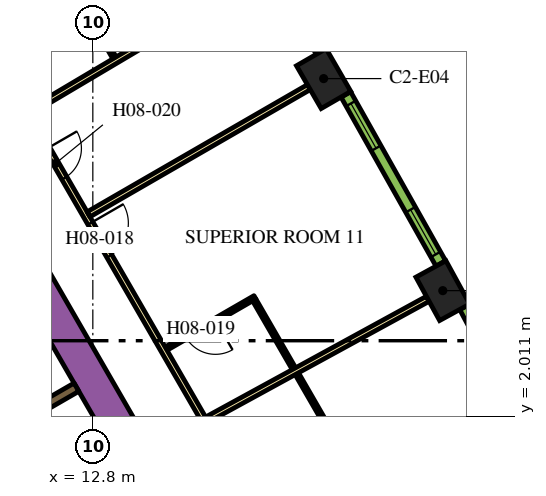
"""IFC4 building model, lengths in metres.
Left out: names, types, materials, properties, quantities, classifications, styles, units other than length and angle.
Written with IfcOpenShell. Run it as: python <this file> out.ifc"""

import sys

from ifc_helpers import new_model, si_unit, direction, frame, frame_2d, origin, origin_2d, place, context, subcontext, project, spatial, rectangle, extrude, element, fill, save


model = new_model("IFC4")
c1 = context("Model", 3, precision=1e-05, world=origin(), true_north=direction((0.0, 1.0)))
c2 = subcontext(c1, "Body", "Model", "MODEL_VIEW")
j1 = project(units=[si_unit("LENGTHUNIT", "METRE"), si_unit("PLANEANGLEUNIT", "RADIAN")], contexts=[c1])
p1 = place(None, origin())
s1 = spatial("IfcSite", under=j1, at=p1, CompositionType="ELEMENT")
p2 = place(p1, origin())
s2 = spatial("IfcBuilding", under=s1, at=p2, CompositionType="ELEMENT")
p3 = place(p2, frame((0.0, 0.0, 107.1)))
s3 = spatial("IfcBuildingStorey", under=s2, at=p3, CompositionType="ELEMENT", Elevation=107.1)
for number, where, z_axis, x_axis in (
    (1, (22.009, 5.317, 0.0), (0.0, 0.0, 1.0), (-0.48, 0.877, 0.0)),
    (2, (18.874, 10.897, 0.0), (0.0, 0.0, 1.0), (-0.5, 0.866, 0.0)),
):
    element("IfcColumn", number, at=place(p3, frame(where, z_axis=z_axis, x_axis=x_axis)), inside=s3, PredefinedType="COLUMN", context=c2, shape_type="SweptSolid", body=[
        extrude(rectangle(XDim=1.3, YDim=0.9, at=origin_2d()), origin(), (0.0, 0.0, 1.0), 3.9),
    ])
p4 = place(p3, frame((6.711, 13.476, 0.0), z_axis=(0.0, 0.0, 1.0), x_axis=(0.500002723396, -0.866023831425, 0.0)))
e3 = element("IfcWall", 3, at=p4, inside=s3, PredefinedType="SOLIDWALL", context=c2, shape_type="SweptSolid", body=[
    extrude(rectangle(XDim=20.334, YDim=0.9, at=frame_2d((10.167, 0.0))), origin(), (0.0, 0.0, 1.0), 3.9),
])
p5 = place(p3, frame((10.464, 1.677, 0.0), z_axis=(0.0, 0.0, 1.0), x_axis=(0.86605622881, 0.499946605688, 0.0)))
e4 = element("IfcWall", 4, at=p5, inside=s3, PredefinedType="SOLIDWALL", context=c2, shape_type="SweptSolid", body=[
    extrude(rectangle(XDim=2.2, YDim=0.25, at=frame_2d((1.1, 0.0))), origin(), (0.0, 0.0, 1.0), 3.9),
])
p6 = place(p3, frame((6.163, 18.475, 0.0), z_axis=(0.0, 0.0, 1.0), x_axis=(0.500001317485, -0.866024643133, 0.0)))
e5 = element("IfcWall", 5, at=p6, inside=s3, PredefinedType="PARTITIONING", context=c2, shape_type="SweptSolid", body=[
    extrude(rectangle(XDim=25.767, YDim=0.15, at=frame_2d((12.883, 0.0))), origin(), (0.0, 0.0, 1.0), 2.75),
])
p7 = place(p6, frame((24.241, 0.0, 0.0)))
e6 = element("IfcOpeningElement", 6, at=p7, cuts=e5, PredefinedType="OPENING", context=c2, shape_type="SweptSolid", body=[
    extrude(rectangle(XDim=1.0, YDim=2.1, at=frame_2d((0.5, 1.05))), frame((0.0, 0.085, 0.0), z_axis=(0.0, -1.0, 0.0), x_axis=(1.0, 0.0, 0.0)), (0.0, 0.0, 1.0), 0.17),
])
p8 = place(p6, frame((13.144, 0.0, 0.0)))
e7 = element("IfcOpeningElement", 7, at=p8, cuts=e5, PredefinedType="OPENING", context=c2, shape_type="SweptSolid", body=[
    extrude(rectangle(XDim=1.0, YDim=2.1, at=frame_2d((0.5, 1.05))), frame((0.0, 0.085, 0.0), z_axis=(0.0, -1.0, 0.0), x_axis=(1.0, 0.0, 0.0)), (0.0, 0.0, 1.0), 0.17),
])
p9 = place(p6, frame((10.874, 0.0, 0.0)))
e8 = element("IfcOpeningElement", 8, at=p9, cuts=e5, PredefinedType="OPENING", context=c2, shape_type="SweptSolid", body=[
    extrude(rectangle(XDim=0.9, YDim=2.1, at=frame_2d((0.45, 1.05))), frame((0.0, 0.085, 0.0), z_axis=(0.0, -1.0, 0.0), x_axis=(1.0, 0.0, 0.0)), (0.0, 0.0, 1.0), 0.17),
])
p10 = place(p6, frame((3.718, 0.0, 0.0)))
e9 = element("IfcOpeningElement", 9, at=p10, cuts=e5, PredefinedType="OPENING", context=c2, shape_type="SweptSolid", body=[
    extrude(rectangle(XDim=1.0, YDim=2.1, at=frame_2d((0.5, 1.05))), frame((0.0, 0.085, 0.0), z_axis=(0.0, -1.0, 0.0), x_axis=(1.0, 0.0, 0.0)), (0.0, 0.0, 1.0), 0.17),
])
p11 = place(p6, frame((2.411, 0.0, 0.0)))
e10 = element("IfcOpeningElement", 10, at=p11, cuts=e5, PredefinedType="OPENING", context=c2, shape_type="SweptSolid", body=[
    extrude(rectangle(XDim=1.0, YDim=2.1, at=frame_2d((0.5, 1.05))), frame((0.0, 0.085, 0.0), z_axis=(0.0, -1.0, 0.0), x_axis=(1.0, 0.0, 0.0)), (0.0, 0.0, 1.0), 0.17),
])
p12 = place(p3, frame((17.379, 13.731, 0.0), z_axis=(0.0, 0.0, 1.0), x_axis=(-0.860132461691, -0.510070728768, 0.0)))
e11 = element("IfcWall", 11, at=p12, inside=s3, PredefinedType="PARTITIONING", context=c2, shape_type="SweptSolid", body=[
    extrude(rectangle(XDim=7.257, YDim=0.15, at=frame_2d((3.628, 0.0))), origin(), (0.0, 0.0, 1.0), 2.75),
])
p13 = place(p3, frame((18.484, 10.672, 0.0), z_axis=(0.0, 0.0, 1.0), x_axis=(-0.866019162053, -0.50001081084, 0.0)))
e12 = element("IfcWall", 12, at=p13, inside=s3, PredefinedType="PARTITIONING", context=c2, shape_type="SweptSolid", body=[
    extrude(rectangle(XDim=6.694, YDim=0.15, at=frame_2d((3.347, 0.0))), origin(), (0.0, 0.0, 1.0), 2.75),
])
p14 = place(p3, frame((21.614, 5.102, 0.0), z_axis=(0.0, 0.0, 1.0), x_axis=(-0.877484555087, -0.479604895287, 0.0)))
e13 = element("IfcWall", 13, at=p14, inside=s3, PredefinedType="PARTITIONING", context=c2, shape_type="SweptSolid", body=[
    extrude(rectangle(XDim=6.611, YDim=0.15, at=frame_2d((3.306, 0.0))), origin(), (0.0, 0.0, 1.0), 2.75),
])
p15 = place(p3, frame((19.151, 1.429, 0.0), z_axis=(0.0, 0.0, 1.0), x_axis=(-0.500024377727, 0.866011328839, 0.0)))
e14 = element("IfcWall", 14, at=p15, inside=s3, PredefinedType="PARTITIONING", context=c2, shape_type="SweptSolid", body=[
    extrude(rectangle(XDim=1.96, YDim=0.1, at=frame_2d((0.98, 0.0))), origin(), (0.0, 0.0, 1.0), 2.75),
])
p16 = place(p3, frame((17.066, 5.141, 0.0), z_axis=(0.0, 0.0, 1.0), x_axis=(-0.866059108428, -0.4999416173, 0.0)))
e15 = element("IfcWall", 15, at=p16, inside=s3, PredefinedType="PARTITIONING", context=c2, shape_type="SweptSolid", body=[
    extrude(rectangle(XDim=2.7, YDim=0.1, at=frame_2d((1.35, 0.0))), origin(), (0.0, 0.0, 1.0), 2.75),
])
p17 = place(p16, frame((1.2, 0.0, 0.0)))
e16 = element("IfcOpeningElement", 16, at=p17, cuts=e15, PredefinedType="OPENING", context=c2, shape_type="SweptSolid", body=[
    extrude(rectangle(XDim=0.9, YDim=2.1, at=frame_2d((0.45, 1.05))), frame((0.0, 0.06, 0.0), z_axis=(0.0, -1.0, 0.0), x_axis=(1.0, 0.0, 0.0)), (0.0, 0.0, 1.0), 0.12),
])
p18 = place(p3, frame((17.047, 5.073, 0.0), z_axis=(0.0, 0.0, 1.0), x_axis=(0.500008976872, -0.866020220923, 0.0)))
e17 = element("IfcWall", 17, at=p18, inside=s3, PredefinedType="PARTITIONING", context=c2, shape_type="SweptSolid", body=[
    extrude(rectangle(XDim=2.09, YDim=0.1, at=frame_2d((1.045, 0.0))), origin(), (0.0, 0.0, 1.0), 2.75),
])
p19 = place(p3, frame((12.372, 13.171, 0.0), z_axis=(0.0, 0.0, 1.0), x_axis=(0.500044573643, -0.86599966765, 0.0)))
e18 = element("IfcWall", 18, at=p19, inside=s3, PredefinedType="PARTITIONING", context=c2, shape_type="SweptSolid", body=[
    extrude(rectangle(XDim=1.99, YDim=0.1, at=frame_2d((0.995, 0.0))), origin(), (0.0, 0.0, 1.0), 2.75),
])
p20 = place(p3, frame((24.977, 0.383, 0.0), z_axis=(0.0, 0.0, 1.0), x_axis=(-0.469323203119, 0.883026461106, 0.0)))
e19 = element("IfcWall", 19, at=p20, inside=s3, PredefinedType="SOLIDWALL", context=c2, shape_type="SweptSolid", body=[
    extrude(rectangle(XDim=5.101, YDim=0.29, at=frame_2d((2.55, 0.0))), origin(), (0.0, 0.0, 1.0), 3.65),
])
p21 = place(p20, frame((0.273, 0.0, 0.9)))
e20 = element("IfcOpeningElement", 20, at=p21, cuts=e19, PredefinedType="OPENING", context=c2, shape_type="SweptSolid", body=[
    extrude(rectangle(XDim=1.35, YDim=2.15, at=frame_2d((0.675, 1.075))), frame((0.0, 0.155, 0.0), z_axis=(0.0, -1.0, 0.0), x_axis=(1.0, 0.0, 0.0)), (0.0, 0.0, 1.0), 0.31),
])
p22 = place(p20, frame((3.478, 0.0, 0.9)))
e21 = element("IfcOpeningElement", 21, at=p22, cuts=e19, PredefinedType="OPENING", context=c2, shape_type="SweptSolid", body=[
    extrude(rectangle(XDim=1.35, YDim=2.15, at=frame_2d((0.675, 1.075))), frame((0.0, 0.155, 0.0), z_axis=(0.0, -1.0, 0.0), x_axis=(1.0, 0.0, 0.0)), (0.0, 0.0, 1.0), 0.31),
])
p23 = place(p3, frame((21.956, 6.033, 0.0), z_axis=(0.0, 0.0, 1.0), x_axis=(-0.48983164787, 0.87181704316, 0.0)))
e22 = element("IfcWall", 22, at=p23, inside=s3, PredefinedType="SOLIDWALL", context=c2, shape_type="SweptSolid", body=[
    extrude(rectangle(XDim=5.1, YDim=0.29, at=frame_2d((2.55, 0.0))), origin(), (0.0, 0.0, 1.0), 3.65),
])
p24 = place(p23, frame((0.273, 0.0, 0.9)))
e23 = element("IfcOpeningElement", 23, at=p24, cuts=e22, PredefinedType="OPENING", context=c2, shape_type="SweptSolid", body=[
    extrude(rectangle(XDim=1.35, YDim=2.15, at=frame_2d((0.675, 1.075))), frame((0.0, 0.155, 0.0), z_axis=(0.0, -1.0, 0.0), x_axis=(1.0, 0.0, 0.0)), (0.0, 0.0, 1.0), 0.31),
])
p25 = place(p23, frame((3.478, 0.0, 0.9)))
e24 = element("IfcOpeningElement", 24, at=p25, cuts=e22, PredefinedType="OPENING", context=c2, shape_type="SweptSolid", body=[
    extrude(rectangle(XDim=1.35, YDim=2.15, at=frame_2d((0.675, 1.075))), frame((0.0, 0.155, 0.0), z_axis=(0.0, -1.0, 0.0), x_axis=(1.0, 0.0, 0.0)), (0.0, 0.0, 1.0), 0.31),
])
p26 = place(p3, frame((18.805, 11.611, 0.0), z_axis=(0.0, 0.0, 1.0), x_axis=(-0.510054281659, 0.860142214847, 0.0)))
e25 = element("IfcWall", 25, at=p26, inside=s3, PredefinedType="SOLIDWALL", context=c2, shape_type="SweptSolid", body=[
    extrude(rectangle(XDim=5.101, YDim=0.29, at=frame_2d((2.55, 0.0))), origin(), (0.0, 0.0, 1.0), 3.65),
])
p27 = place(p26, frame((0.273, 0.0, 0.9)))
e26 = element("IfcOpeningElement", 26, at=p27, cuts=e25, PredefinedType="OPENING", context=c2, shape_type="SweptSolid", body=[
    extrude(rectangle(XDim=1.35, YDim=2.15, at=frame_2d((0.675, 1.075))), frame((0.0, 0.155, 0.0), z_axis=(0.0, -1.0, 0.0), x_axis=(1.0, 0.0, 0.0)), (0.0, 0.0, 1.0), 0.31),
])
p28 = place(p26, frame((3.478, 0.0, 0.9)))
e27 = element("IfcOpeningElement", 27, at=p28, cuts=e25, PredefinedType="OPENING", context=c2, shape_type="SweptSolid", body=[
    extrude(rectangle(XDim=1.35, YDim=2.15, at=frame_2d((0.675, 1.075))), frame((0.0, 0.155, 0.0), z_axis=(0.0, -1.0, 0.0), x_axis=(1.0, 0.0, 0.0)), (0.0, 0.0, 1.0), 0.31),
])
p29 = place(p8, origin())
e28 = element("IfcDoor", 28, at=p29, inside=s3, OperationType="SINGLE_SWING_LEFT", PredefinedType="DOOR", context=c2, shape_type="SweptSolid", body=[
    extrude(rectangle(XDim=1.0, YDim=2.1, at=frame_2d((0.5, 1.05))), frame((0.0, 0.025, 0.0), z_axis=(0.0, -1.0, 0.0), x_axis=(1.0, 0.0, 0.0)), (0.0, 0.0, 1.0), 0.05),
])
fill(e7, e28)
p30 = place(p17, origin())
e29 = element("IfcDoor", 29, at=p30, inside=s3, OperationType="SINGLE_SWING_LEFT", PredefinedType="DOOR", context=c2, shape_type="SweptSolid", body=[
    extrude(rectangle(XDim=0.9, YDim=2.1, at=frame_2d((0.45, 1.05))), frame((0.0, 0.025, 0.0), z_axis=(0.0, -1.0, 0.0), x_axis=(1.0, 0.0, 0.0)), (0.0, 0.0, 1.0), 0.05),
])
fill(e16, e29)
p31 = place(p9, origin())
e30 = element("IfcDoor", 30, at=p31, inside=s3, OperationType="SINGLE_SWING_RIGHT", PredefinedType="DOOR", context=c2, shape_type="SweptSolid", body=[
    extrude(rectangle(XDim=0.9, YDim=2.1, at=frame_2d((0.45, 1.05))), frame((0.0, 0.025, 0.0), z_axis=(0.0, -1.0, 0.0), x_axis=(1.0, 0.0, 0.0)), (0.0, 0.0, 1.0), 0.05),
])
fill(e8, e30)
p32 = place(p24, origin())
e31 = element("IfcWindow", 31, at=p32, inside=s3, PartitioningType="DOUBLE_PANEL_VERTICAL", PredefinedType="WINDOW", context=c2, shape_type="SweptSolid", body=[
    extrude(rectangle(XDim=1.35, YDim=2.15, at=frame_2d((0.675, 1.075))), frame((0.0, 0.015, 0.0), z_axis=(0.0, -1.0, 0.0), x_axis=(1.0, 0.0, 0.0)), (0.0, 0.0, 1.0), 0.06),
])
fill(e23, e31)
p33 = place(p25, origin())
e32 = element("IfcWindow", 32, at=p33, inside=s3, PartitioningType="DOUBLE_PANEL_VERTICAL", PredefinedType="WINDOW", context=c2, shape_type="SweptSolid", body=[
    extrude(rectangle(XDim=1.35, YDim=2.15, at=frame_2d((0.675, 1.075))), frame((0.0, 0.015, 0.0), z_axis=(0.0, -1.0, 0.0), x_axis=(1.0, 0.0, 0.0)), (0.0, 0.0, 1.0), 0.06),
])
fill(e24, e32)
save(model, sys.argv[1])
